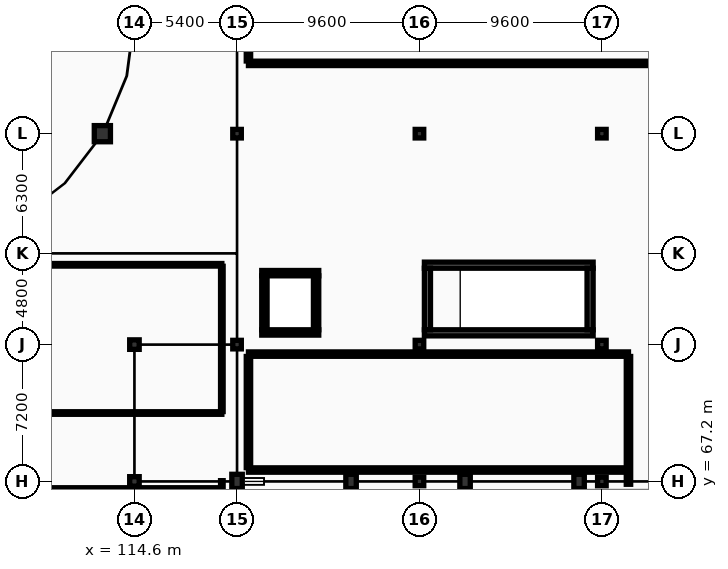
"""IFC4 building model, lengths in metres.
Left out: names, types, materials, properties, quantities, classifications, styles, units other than length and angle.
Written with IfcOpenShell. Run it as: python <this file> out.ifc"""

import sys

from ifc_helpers import new_model, si_unit, direction, frame, frame_2d, origin, origin_2d, place, context, subcontext, project, spatial, rectangle, circle, extrude, element, fill, save


model = new_model("IFC4")
c1 = context("Model", 3, precision=1e-05, world=origin(), true_north=direction((0.0, 1.0)))
c2 = subcontext(c1, "Body", "Model", "MODEL_VIEW")
j1 = project(units=[si_unit("LENGTHUNIT", "METRE"), si_unit("PLANEANGLEUNIT", "RADIAN")], contexts=[c1])
p1 = place(None, origin())
s1 = spatial("IfcSite", under=j1, at=p1, CompositionType="ELEMENT")
p2 = place(p1, origin())
s2 = spatial("IfcBuilding", under=s1, at=p2, CompositionType="ELEMENT")
p3 = place(p2, frame((0.0, 0.0, 5.4)))
s3 = spatial("IfcBuildingStorey", under=s2, at=p3, CompositionType="ELEMENT", Elevation=5.4)
p4 = place(p3, frame((112.912, 85.5, 0.0), z_axis=(0.0, 0.0, 1.0), x_axis=(1.0, 0.0, 0.0)))
e1 = element("IfcColumn", 1, at=p4, inside=s3, PredefinedType="COLUMN", context=c2, shape_type="SweptSolid", body=[
    extrude(circle(Radius=0.425, at=origin_2d()), origin(), (0.0, 0.0, 1.0), 4.5),
])
for number, where, z_axis, x_axis in (
    (2, (120.0, 67.2, 0.0), (0.0, 0.0, 1.0), (1.0, 0.0, 0.0)),
    (3, (126.0, 67.2, 0.0), (0.0, 0.0, 1.0), (1.0, 0.0, 0.0)),
    (4, (132.0, 67.2, 0.0), (0.0, 0.0, 1.0), (1.0, 0.0, 0.0)),
    (5, (138.0, 67.2, 0.0), (0.0, 0.0, 1.0), (1.0, 0.0, 0.0)),
):
    element("IfcColumn", number, at=place(p3, frame(where, z_axis=z_axis, x_axis=x_axis)), inside=s3, PredefinedType="COLUMN", context=c2, shape_type="SweptSolid", body=[
        extrude(rectangle(XDim=0.55, YDim=0.75, at=origin_2d()), origin(), (0.0, 0.0, 1.0), 4.5),
    ])
for number, where, z_axis, x_axis in (
    (6, (120.0, 74.4, 0.0), (0.0, 0.0, 1.0), (1.0, 0.0, 0.0)),
    (7, (120.0, 85.5, 0.0), (0.0, 0.0, 1.0), (1.0, 0.0, 0.0)),
    (8, (129.6, 67.2, 0.0), (0.0, 0.0, 1.0), (1.0, 0.0, 0.0)),
    (9, (129.6, 74.4, 0.0), (0.0, 0.0, 1.0), (1.0, 0.0, 0.0)),
    (10, (129.6, 85.5, 0.0), (0.0, 0.0, 1.0), (1.0, 0.0, 0.0)),
    (11, (139.2, 67.2, 0.0), (0.0, 0.0, 1.0), (1.0, 0.0, 0.0)),
    (12, (139.2, 74.4, 0.0), (0.0, 0.0, 1.0), (1.0, 0.0, 0.0)),
    (13, (139.2, 85.5, 0.0), (0.0, 0.0, 1.0), (1.0, 0.0, 0.0)),
):
    element("IfcColumn", number, at=place(p3, frame(where, z_axis=z_axis, x_axis=x_axis)), inside=s3, PredefinedType="COLUMN", context=c2, shape_type="SweptSolid", body=[
        extrude(rectangle(XDim=0.45, YDim=0.45, at=origin_2d()), origin(), (0.0, 0.0, 1.0), 4.5),
    ])
for number, where, z_axis, x_axis in (
    (14, (114.6, 67.2, 0.0), (0.0, 0.0, 1.0), (1.0, 0.0, 0.0)),
    (15, (114.6, 74.4, 0.0), (0.0, 0.0, 1.0), (1.0, 0.0, 0.0)),
):
    element("IfcColumn", number, at=place(p3, frame(where, z_axis=z_axis, x_axis=x_axis)), inside=s3, PredefinedType="COLUMN", context=c2, shape_type="SweptSolid", body=[
        extrude(rectangle(XDim=0.5, YDim=0.5, at=origin_2d()), origin(), (0.0, 0.0, 1.0), 4.5),
    ])
for number, where, z_axis, x_axis in (
    (16, (129.86, 78.58, 0.0), (0.0, 0.0, 1.0), (1.0, 0.0, 0.0)),
    (17, (138.74, 75.02, 0.0), (0.0, 0.0, 1.0), (-1.0, 0.0, 0.0)),
):
    element("IfcWall", number, at=place(p3, frame(where, z_axis=z_axis, x_axis=x_axis)), inside=s3, PredefinedType="SHEAR", context=c2, shape_type="SweptSolid", body=[
        extrude(rectangle(XDim=8.88, YDim=0.32, at=frame_2d((4.44, 0.0))), origin(), (0.0, 0.0, 1.0), 4.24),
    ])
p5 = place(p3, frame((130.02, 75.18, 0.0), z_axis=(0.0, 0.0, 1.0), x_axis=(0.0, 1.0, 0.0)))
e18 = element("IfcWall", 18, at=p5, inside=s3, PredefinedType="SHEAR", context=c2, shape_type="SweptSolid", body=[
    extrude(rectangle(XDim=3.24, YDim=0.32, at=frame_2d((1.62, 0.0))), origin(), (0.0, 0.0, 1.0), 4.24),
])
p6 = place(p5, frame((1.045, 0.0, 0.0)))
e19 = element("IfcOpeningElement", 19, at=p6, cuts=e18, PredefinedType="OPENING", context=c2, shape_type="SweptSolid", body=[
    extrude(rectangle(XDim=1.15, YDim=2.2, at=frame_2d((0.575, 1.1))), frame((0.0, 0.17, 0.0), z_axis=(0.0, -1.0, 0.0), x_axis=(1.0, 0.0, 0.0)), (0.0, 0.0, 1.0), 0.34),
])
p7 = place(p3, frame((138.58, 78.42, 0.0), z_axis=(0.0, 0.0, 1.0), x_axis=(0.0, -1.0, 0.0)))
e20 = element("IfcWall", 20, at=p7, inside=s3, PredefinedType="SHEAR", context=c2, shape_type="SweptSolid", body=[
    extrude(rectangle(XDim=3.24, YDim=0.32, at=frame_2d((1.62, 0.0))), origin(), (0.0, 0.0, 1.0), 4.24),
])
p8 = place(p3, frame((121.3, 78.16, 0.0), z_axis=(0.0, 0.0, 1.0), x_axis=(1.0, 0.0, 0.0)))
e21 = element("IfcWall", 21, at=p8, inside=s3, PredefinedType="SHEAR", context=c2, shape_type="SweptSolid", body=[
    extrude(rectangle(XDim=3.0, YDim=0.28, at=frame_2d((1.5, 0.0))), origin(), (0.0, 0.0, 1.0), 4.24),
])
p9 = place(p8, frame((0.975, 0.0, 0.0)))
e22 = element("IfcOpeningElement", 22, at=p9, cuts=e21, PredefinedType="OPENING", context=c2, shape_type="SweptSolid", body=[
    extrude(rectangle(XDim=1.05, YDim=2.2, at=frame_2d((0.525, 1.1))), frame((0.0, 0.15, 0.0), z_axis=(0.0, -1.0, 0.0), x_axis=(1.0, 0.0, 0.0)), (0.0, 0.0, 1.0), 0.3),
])
p10 = place(p3, frame((124.3, 75.04, 0.0), z_axis=(0.0, 0.0, 1.0), x_axis=(-1.0, 0.0, 0.0)))
e23 = element("IfcWall", 23, at=p10, inside=s3, PredefinedType="SHEAR", context=c2, shape_type="SweptSolid", body=[
    extrude(rectangle(XDim=3.0, YDim=0.28, at=frame_2d((1.5, 0.0))), origin(), (0.0, 0.0, 1.0), 4.24),
])
for number, where, z_axis, x_axis in (
    (24, (121.44, 75.18, 0.0), (0.0, 0.0, 1.0), (0.0, 1.0, 0.0)),
    (25, (124.16, 78.02, 0.0), (0.0, 0.0, 1.0), (0.0, -1.0, 0.0)),
):
    element("IfcWall", number, at=place(p3, frame(where, z_axis=z_axis, x_axis=x_axis)), inside=s3, PredefinedType="SHEAR", context=c2, shape_type="SweptSolid", body=[
        extrude(rectangle(XDim=2.84, YDim=0.28, at=frame_2d((1.42, 0.0))), origin(), (0.0, 0.0, 1.0), 4.24),
    ])
p11 = place(p3, frame((104.2, 66.8, 0.0), z_axis=(0.0, 0.0, 1.0), x_axis=(1.0, 0.0, 0.0)))
e26 = element("IfcWall", 26, at=p11, inside=s3, PredefinedType="PARTITIONING", context=c2, shape_type="SweptSolid", body=[
    extrude(rectangle(XDim=15.0, YDim=0.135, at=frame_2d((7.5, 0.0))), origin(), (0.0, 0.0, 1.0), 3.23),
])
p12 = place(p3, frame((119.2, 67.24, 0.0), z_axis=(0.0, 0.0, 1.0), x_axis=(0.0, -1.0, 0.0)))
e27 = element("IfcWall", 27, at=p12, inside=s3, PredefinedType="PARTITIONING", context=c2, shape_type="SweptSolid", body=[
    extrude(rectangle(XDim=13.163, YDim=0.135, at=frame_2d((6.581, 0.0))), origin(), (0.0, 0.0, 1.0), 3.53),
])
p13 = place(p3, frame((102.4, 78.6, 0.0), z_axis=(0.0, 0.0, 1.0), x_axis=(1.0, 0.0, 0.0)))
e28 = element("IfcWall", 28, at=p13, inside=s3, PredefinedType="PARTITIONING", context=c2, shape_type="SweptSolid", body=[
    extrude(rectangle(XDim=16.8, YDim=0.135, at=frame_2d((8.4, 0.0))), origin(), (0.0, 0.0, 1.0), 3.27),
])
p14 = place(p3, frame((119.2, 70.8, 0.0), z_axis=(0.0, 0.0, 1.0), x_axis=(-1.0, 0.0, 0.0)))
e29 = element("IfcWall", 29, at=p14, inside=s3, PredefinedType="PARTITIONING", context=c2, shape_type="SweptSolid", body=[
    extrude(rectangle(XDim=16.8, YDim=0.135, at=frame_2d((8.4, 0.0))), origin(), (0.0, 0.0, 1.0), 3.63),
])
p15 = place(p14, frame((2.623, 0.0, 0.0)))
e30 = element("IfcOpeningElement", 30, at=p15, cuts=e29, PredefinedType="OPENING", context=c2, shape_type="SweptSolid", body=[
    extrude(rectangle(XDim=0.95, YDim=2.15, at=frame_2d((0.475, 1.075))), frame((0.0, 0.077, 0.0), z_axis=(0.0, -1.0, 0.0), x_axis=(1.0, 0.0, 0.0)), (0.0, 0.0, 1.0), 0.155),
])
p16 = place(p3, frame((119.2, 78.522, 0.0), z_axis=(0.0, 0.0, 1.0), x_axis=(0.0, -1.0, 0.0)))
e31 = element("IfcWall", 31, at=p16, inside=s3, PredefinedType="PARTITIONING", context=c2, shape_type="SweptSolid", body=[
    extrude(rectangle(XDim=7.645, YDim=0.135, at=frame_2d((3.823, 0.0))), origin(), (0.0, 0.0, 1.0), 3.53),
])
p17 = place(p3, frame((120.6, 73.9, 0.0), z_axis=(0.0, 0.0, 1.0), x_axis=(1.0, 0.0, 0.0)))
e32 = element("IfcWall", 32, at=p17, inside=s3, PredefinedType="STANDARD", context=c2, shape_type="SweptSolid", body=[
    extrude(rectangle(XDim=20.0, YDim=0.23, at=frame_2d((10.0, 0.0))), origin(), (0.0, 0.0, 1.0), 3.72),
])
p18 = place(p17, frame((5.825, 0.0, 0.0)))
e33 = element("IfcOpeningElement", 33, at=p18, cuts=e32, PredefinedType="OPENING", context=c2, shape_type="SweptSolid", body=[
    extrude(rectangle(XDim=1.05, YDim=2.15, at=frame_2d((0.525, 1.075))), frame((0.0, 0.125, 0.0), z_axis=(0.0, -1.0, 0.0), x_axis=(1.0, 0.0, 0.0)), (0.0, 0.0, 1.0), 0.25),
])
p19 = place(p3, frame((140.6, 67.8, 0.0), z_axis=(0.0, 0.0, 1.0), x_axis=(-1.0, 0.0, 0.0)))
e34 = element("IfcWall", 34, at=p19, inside=s3, PredefinedType="STANDARD", context=c2, shape_type="SweptSolid", body=[
    extrude(rectangle(XDim=20.0, YDim=0.23, at=frame_2d((10.0, 0.0))), origin(), (0.0, 0.0, 1.0), 3.72),
])
p20 = place(p3, frame((120.6, 67.925, 0.0), z_axis=(0.0, 0.0, 1.0), x_axis=(0.0, 1.0, 0.0)))
e35 = element("IfcWall", 35, at=p20, inside=s3, PredefinedType="STANDARD", context=c2, shape_type="SweptSolid", body=[
    extrude(rectangle(XDim=5.85, YDim=0.23, at=frame_2d((2.925, 0.0))), origin(), (0.0, 0.0, 1.0), 3.67),
])
p21 = place(p3, frame((140.6, 73.775, 0.0), z_axis=(0.0, 0.0, 1.0), x_axis=(0.0, -1.0, 0.0)))
e36 = element("IfcWall", 36, at=p21, inside=s3, PredefinedType="STANDARD", context=c2, shape_type="SweptSolid", body=[
    extrude(rectangle(XDim=6.725, YDim=0.23, at=frame_2d((3.362, 0.0))), origin(), (0.0, 0.0, 1.0), 3.57),
])
p22 = place(p3, frame((148.4, 89.2, 0.0), z_axis=(0.0, 0.0, 1.0), x_axis=(-1.0, 0.0, 0.0)))
e37 = element("IfcWall", 37, at=p22, inside=s3, PredefinedType="STANDARD", context=c2, shape_type="SweptSolid", body=[
    extrude(rectangle(XDim=27.8, YDim=0.23, at=frame_2d((13.9, 0.0))), origin(), (0.0, 0.0, 1.0), 3.37),
])
p23 = place(p22, frame((2.955, 0.0, 0.0)))
e38 = element("IfcOpeningElement", 38, at=p23, cuts=e37, PredefinedType="OPENING", context=c2, shape_type="SweptSolid", body=[
    extrude(rectangle(XDim=1.05, YDim=2.15, at=frame_2d((0.525, 1.075))), frame((0.0, 0.125, 0.0), z_axis=(0.0, -1.0, 0.0), x_axis=(1.0, 0.0, 0.0)), (0.0, 0.0, 1.0), 0.25),
])
p24 = place(p3, frame((120.6, 89.325, 0.0), z_axis=(0.0, 0.0, 1.0), x_axis=(0.0, 1.0, 0.0)))
e39 = element("IfcWall", 39, at=p24, inside=s3, PredefinedType="STANDARD", context=c2, shape_type="SweptSolid", body=[
    extrude(rectangle(XDim=23.011, YDim=0.23, at=frame_2d((11.505, 0.0))), origin(), (0.0, 0.0, 1.0), 3.47),
])
p25 = place(p6, origin())
e40 = element("IfcDoor", 40, at=p25, inside=s3, OperationType="SINGLE_SWING_LEFT", PredefinedType="DOOR", context=c2, shape_type="SweptSolid", body=[
    extrude(rectangle(XDim=1.15, YDim=2.2, at=frame_2d((0.575, 1.1))), frame((0.0, 0.025, 0.0), z_axis=(0.0, -1.0, 0.0), x_axis=(1.0, 0.0, 0.0)), (0.0, 0.0, 1.0), 0.05),
])
fill(e19, e40)
p26 = place(p9, origin())
e41 = element("IfcDoor", 41, at=p26, inside=s3, OperationType="DOUBLE_DOOR_SLIDING", PredefinedType="DOOR", context=c2, shape_type="SweptSolid", body=[
    extrude(rectangle(XDim=1.05, YDim=2.2, at=frame_2d((0.525, 1.1))), frame((0.0, 0.025, 0.0), z_axis=(0.0, -1.0, 0.0), x_axis=(1.0, 0.0, 0.0)), (0.0, 0.0, 1.0), 0.05),
])
fill(e22, e41)
p27 = place(p15, origin())
e42 = element("IfcDoor", 42, at=p27, inside=s3, OperationType="SINGLE_SWING_LEFT", PredefinedType="DOOR", context=c2, shape_type="SweptSolid", body=[
    extrude(rectangle(XDim=0.95, YDim=2.15, at=frame_2d((0.475, 1.075))), frame((0.0, 0.025, 0.0), z_axis=(0.0, -1.0, 0.0), x_axis=(1.0, 0.0, 0.0)), (0.0, 0.0, 1.0), 0.05),
])
fill(e30, e42)
p28 = place(p18, origin())
e43 = element("IfcDoor", 43, at=p28, inside=s3, OperationType="SINGLE_SWING_LEFT", PredefinedType="DOOR", context=c2, shape_type="SweptSolid", body=[
    extrude(rectangle(XDim=1.05, YDim=2.15, at=frame_2d((0.525, 1.075))), frame((0.0, 0.025, 0.0), z_axis=(0.0, -1.0, 0.0), x_axis=(1.0, 0.0, 0.0)), (0.0, 0.0, 1.0), 0.05),
])
fill(e33, e43)
save(model, sys.argv[1])
